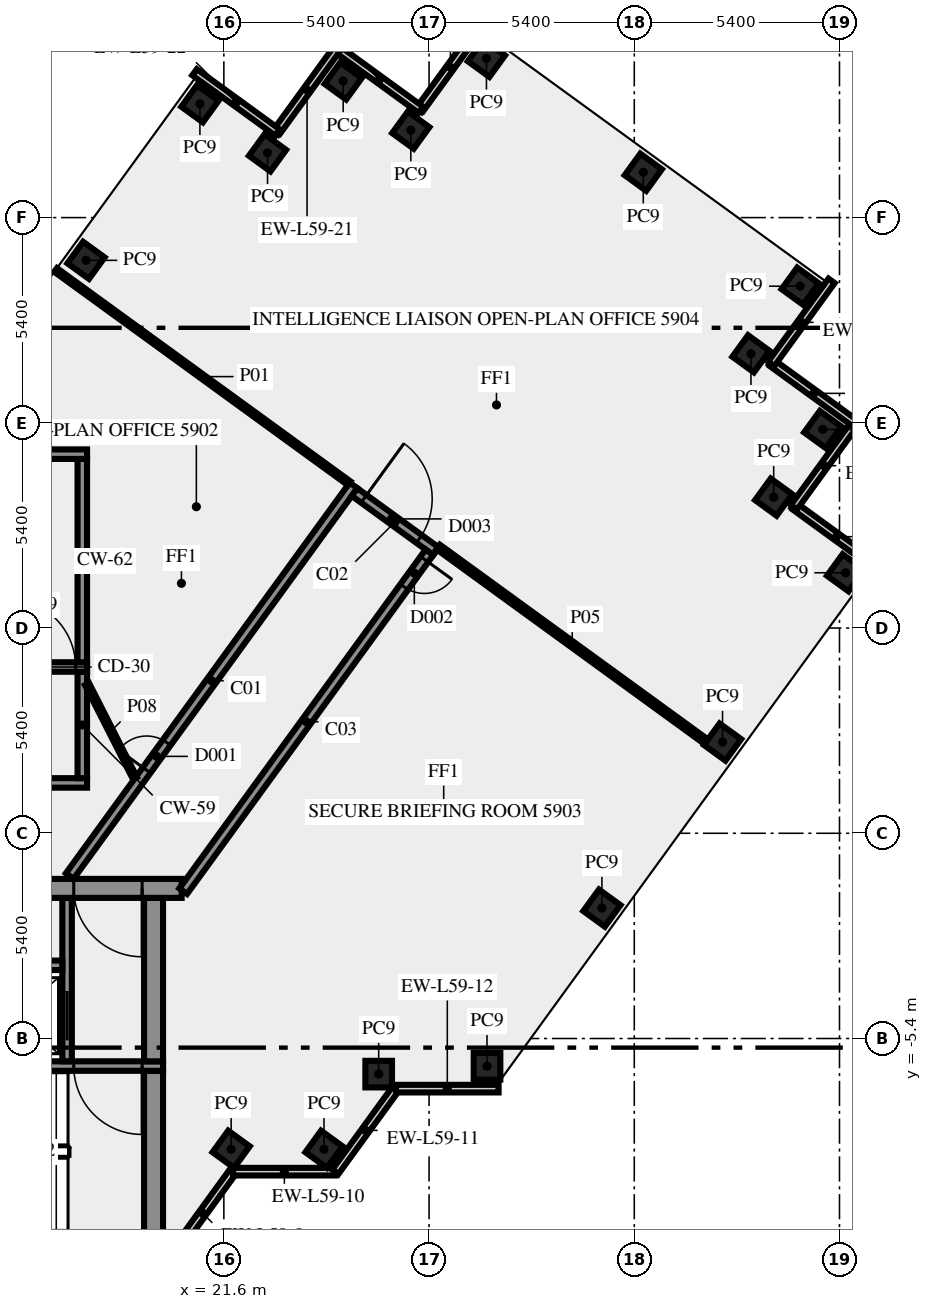
"""IFC4 building model, lengths in metres.
Left out: names, types, materials, properties, quantities, classifications, styles, units other than length and angle.
Written with IfcOpenShell. Run it as: python <this file> out.ifc"""

import sys

from ifc_helpers import new_model, si_unit, direction, frame, frame_2d, origin, origin_2d, place, context, subcontext, project, spatial, rectangle, extrude, element, fill, save


model = new_model("IFC4")
c1 = context("Model", 3, precision=1e-05, world=origin(), true_north=direction((0.0, 1.0)))
c2 = subcontext(c1, "Body", "Model", "MODEL_VIEW")
j1 = project(units=[si_unit("LENGTHUNIT", "METRE"), si_unit("PLANEANGLEUNIT", "RADIAN")], contexts=[c1])
p1 = place(None, origin())
s1 = spatial("IfcSite", under=j1, at=p1, CompositionType="ELEMENT")
p2 = place(p1, origin())
s2 = spatial("IfcBuilding", under=s1, at=p2, CompositionType="ELEMENT")
p3 = place(p2, frame((0.0, 0.0, 253.0)))
s3 = spatial("IfcBuildingStorey", under=s2, at=p3, CompositionType="ELEMENT", Elevation=253.0)
for number, where, z_axis, x_axis in (
    (1, (21.792, -8.315, 0.0), (0.0, 0.0, 1.0), (0.588, 0.809, 0.0)),
    (2, (24.235, -8.315, 0.0), (0.0, 0.0, 1.0), (0.588, 0.809, 0.0)),
    (3, (25.674, -6.337, 0.0), (0.0, 0.0, 1.0), (1.0, 0.0, 0.0)),
    (4, (28.525, -6.13, 0.0), (0.0, 0.0, 1.0), (1.0, 0.0, 0.0)),
    (5, (31.548, -1.969, 0.0), (0.0, 0.0, 1.0), (0.588, 0.809, 0.0)),
    (6, (34.722, 2.4, 0.0), (0.0, 0.0, 1.0), (0.588, 0.809, 0.0)),
    (7, (37.96, 6.855, 0.0), (0.0, 0.0, 1.0), (0.588, 0.809, 0.0)),
    (8, (36.068, 8.844, 0.0), (0.0, 0.0, 1.0), (0.588, 0.809, 0.0)),
    (9, (37.36, 10.625, 0.0), (0.0, 0.0, 1.0), (0.588, 0.809, 0.0)),
    (10, (35.471, 12.616, 0.0), (0.0, 0.0, 1.0), (-0.809, 0.588, 0.0)),
    (11, (36.765, 14.395, 0.0), (0.0, 0.0, 1.0), (-0.809, 0.588, 0.0)),
    (12, (32.637, 17.393, 0.0), (0.0, 0.0, 1.0), (-0.809, 0.588, 0.0)),
    (13, (28.51, 20.39, 0.0), (0.0, 0.0, 1.0), (-0.588, -0.809, 0.0)),
    (14, (26.519, 18.5, 0.0), (0.0, 0.0, 1.0), (-0.809, 0.588, 0.0)),
    (15, (24.74, 19.795, 0.0), (0.0, 0.0, 1.0), (-0.588, -0.809, 0.0)),
    (16, (22.749, 17.904, 0.0), (0.0, 0.0, 1.0), (-0.588, -0.809, 0.0)),
    (17, (20.97, 19.195, 0.0), (0.0, 0.0, 1.0), (-0.588, -0.809, 0.0)),
    (18, (17.974, 15.075, 0.0), (0.0, 0.0, 1.0), (-0.588, -0.809, 0.0)),
):
    element("IfcColumn", number, at=place(p3, frame(where, z_axis=z_axis, x_axis=x_axis)), inside=s3, PredefinedType="COLUMN", context=c2, shape_type="SweptSolid", body=[
        extrude(rectangle(XDim=0.7, YDim=0.7, at=origin_2d()), origin(), (0.0, 0.0, 1.0), 3.65),
    ])
p4 = place(p3, frame((20.253, -11.083, 0.0), z_axis=(0.0, 0.0, 1.0), x_axis=(0.587766567315, 0.809030569476, 0.0)))
e19 = element("IfcWall", 19, at=p4, inside=s3, PredefinedType="SOLIDWALL", context=c2, shape_type="SweptSolid", body=[
    extrude(rectangle(XDim=2.688, YDim=0.2, at=frame_2d((1.344, 0.0))), origin(), (0.0, 0.0, 1.0), 3.65),
])
p5 = place(p3, frame((21.843, -8.904, 0.0), z_axis=(0.0, 0.0, 1.0), x_axis=(1.0, 0.0, 0.0)))
e20 = element("IfcWall", 20, at=p5, inside=s3, PredefinedType="SOLIDWALL", context=c2, shape_type="SweptSolid", body=[
    extrude(rectangle(XDim=2.7, YDim=0.2, at=frame_2d((1.35, 0.0))), origin(), (0.0, 0.0, 1.0), 3.65),
])
p6 = place(p3, frame((24.533, -8.909, 0.0), z_axis=(0.0, 0.0, 1.0), x_axis=(0.587720002413, 0.809064397168, 0.0)))
e21 = element("IfcWall", 21, at=p6, inside=s3, PredefinedType="SOLIDWALL", context=c2, shape_type="SweptSolid", body=[
    extrude(rectangle(XDim=2.7, YDim=0.2, at=frame_2d((1.35, 0.0))), origin(), (0.0, 0.0, 1.0), 3.65),
])
for number, where, z_axis, x_axis in (
    (22, (26.13, -6.719, 0.0), (0.0, 0.0, 1.0), (1.0, 0.0, 0.0)),
    (23, (38.814, 7.01, 0.0), (0.0, 0.0, 1.0), (-0.809, 0.588, 0.0)),
    (24, (36.602, 8.58, 0.0), (0.0, 0.0, 1.0), (0.588, 0.809, 0.0)),
    (25, (38.216, 10.782, 0.0), (0.0, 0.0, 1.0), (-0.809, 0.588, 0.0)),
    (26, (36.005, 12.352, 0.0), (0.0, 0.0, 1.0), (0.588, 0.809, 0.0)),
):
    element("IfcWall", number, at=place(p3, frame(where, z_axis=z_axis, x_axis=x_axis)), inside=s3, PredefinedType="SOLIDWALL", context=c2, shape_type="SweptSolid", body=[
        extrude(rectangle(XDim=2.7, YDim=0.2, at=frame_2d((1.35, 0.0))), origin(), (0.0, 0.0, 1.0), 3.65),
    ])
for number, where, z_axis, x_axis in (
    (27, (28.354, 21.247, 0.0), (0.0, 0.0, 1.0), (-0.588, -0.809, 0.0)),
    (28, (26.785, 19.036, 0.0), (0.0, 0.0, 1.0), (-0.809, 0.588, 0.0)),
):
    element("IfcWall", number, at=place(p3, frame(where, z_axis=z_axis, x_axis=x_axis)), inside=s3, PredefinedType="SOLIDWALL", context=c2, shape_type="SweptSolid", body=[
        extrude(rectangle(XDim=2.7, YDim=0.2, at=frame_2d((1.35, 0.0))), origin(), (0.0, 0.0, 1.0), 3.65),
    ])
for number, where, z_axis, x_axis in (
    (29, (24.583, 20.65, 0.0), (0.0, 0.0, 1.0), (-0.588, -0.809, 0.0)),
    (30, (23.013, 18.438, 0.0), (0.0, 0.0, 1.0), (-0.809, 0.588, 0.0)),
):
    element("IfcWall", number, at=place(p3, frame(where, z_axis=z_axis, x_axis=x_axis)), inside=s3, PredefinedType="SOLIDWALL", context=c2, shape_type="SweptSolid", body=[
        extrude(rectangle(XDim=2.7, YDim=0.2, at=frame_2d((1.35, 0.0))), origin(), (0.0, 0.0, 1.0), 3.65),
    ])
p7 = place(p3, frame((19.75, -10.5, 0.0), z_axis=(0.0, 0.0, 1.0), x_axis=(0.0, 1.0, 0.0)))
e31 = element("IfcWall", 31, at=p7, inside=s3, PredefinedType="SHEAR", context=c2, shape_type="SweptSolid", body=[
    extrude(rectangle(XDim=4.25, YDim=0.5, at=frame_2d((2.125, 0.0))), origin(), (0.0, 0.0, 1.0), 3.65),
])
p8 = place(p3, frame((20.0, -6.125, 0.0), z_axis=(0.0, 0.0, 1.0), x_axis=(-1.0, 0.0, 0.0)))
e32 = element("IfcWall", 32, at=p8, inside=s3, PredefinedType="SHEAR", context=c2, shape_type="SweptSolid", body=[
    extrude(rectangle(XDim=10.2, YDim=0.25, at=frame_2d((5.1, 0.0))), origin(), (0.0, 0.0, 1.0), 3.65),
])
p9 = place(p8, frame((0.55, 0.0, 0.0)))
e33 = element("IfcOpeningElement", 33, at=p9, cuts=e32, PredefinedType="OPENING", context=c2, shape_type="SweptSolid", body=[
    extrude(rectangle(XDim=1.8, YDim=2.1, at=frame_2d((0.9, 1.05))), frame((0.0, 0.135, 0.0), z_axis=(0.0, -1.0, 0.0), x_axis=(1.0, 0.0, 0.0)), (0.0, 0.0, 1.0), 0.27),
])
p10 = place(p3, frame((17.475, -6.0, 0.0), z_axis=(0.0, 0.0, 1.0), x_axis=(0.0, 1.0, 0.0)))
e34 = element("IfcWall", 34, at=p10, inside=s3, PredefinedType="SHEAR", context=c2, shape_type="SweptSolid", body=[
    extrude(rectangle(XDim=4.3, YDim=0.25, at=frame_2d((2.15, 0.0))), origin(), (0.0, 0.0, 1.0), 3.65),
])
p11 = place(p10, frame((0.55, 0.0, 0.0)))
e35 = element("IfcOpeningElement", 35, at=p11, cuts=e34, PredefinedType="OPENING", context=c2, shape_type="SweptSolid", body=[
    extrude(rectangle(XDim=1.3, YDim=2.1, at=frame_2d((0.65, 1.05))), frame((0.0, 0.135, 0.0), z_axis=(0.0, -1.0, 0.0), x_axis=(1.0, 0.0, 0.0)), (0.0, 0.0, 1.0), 0.27),
])
p12 = place(p3, frame((19.75, -6.0, 0.0), z_axis=(0.0, 0.0, 1.0), x_axis=(0.0, 1.0, 0.0)))
e36 = element("IfcWall", 36, at=p12, inside=s3, PredefinedType="SHEAR", context=c2, shape_type="SweptSolid", body=[
    extrude(rectangle(XDim=4.3, YDim=0.5, at=frame_2d((2.15, 0.0))), origin(), (0.0, 0.0, 1.0), 3.65),
])
p13 = place(p3, frame((14.1, -3.475, 0.0), z_axis=(0.0, 0.0, 1.0), x_axis=(1.0, 0.0, 0.0)))
e37 = element("IfcWall", 37, at=p13, inside=s3, PredefinedType="SHEAR", context=c2, shape_type="SweptSolid", body=[
    extrude(rectangle(XDim=3.25, YDim=0.25, at=frame_2d((1.625, 0.0))), origin(), (0.0, 0.0, 1.0), 3.65),
])
p14 = place(p3, frame((20.49, -1.45, 0.0), z_axis=(0.0, 0.0, 1.0), x_axis=(-1.0, 0.0, 0.0)))
e38 = element("IfcWall", 38, at=p14, inside=s3, PredefinedType="SHEAR", context=c2, shape_type="SweptSolid", body=[
    extrude(rectangle(XDim=40.98, YDim=0.5, at=frame_2d((20.49, 0.0))), origin(), (0.0, 0.0, 1.0), 3.65),
])
p15 = place(p14, frame((38.14, 0.0, 0.0)))
e39 = element("IfcOpeningElement", 39, at=p15, cuts=e38, PredefinedType="OPENING", context=c2, shape_type="SweptSolid", body=[
    extrude(rectangle(XDim=1.8, YDim=2.1, at=frame_2d((0.9, 1.05))), frame((0.0, 0.26, 0.0), z_axis=(0.0, -1.0, 0.0), x_axis=(1.0, 0.0, 0.0)), (0.0, 0.0, 1.0), 0.52),
])
p16 = place(p14, frame((35.89, 0.0, 0.0)))
e40 = element("IfcOpeningElement", 40, at=p16, cuts=e38, PredefinedType="OPENING", context=c2, shape_type="SweptSolid", body=[
    extrude(rectangle(XDim=0.9, YDim=2.1, at=frame_2d((0.45, 1.05))), frame((0.0, 0.26, 0.0), z_axis=(0.0, -1.0, 0.0), x_axis=(1.0, 0.0, 0.0)), (0.0, 0.0, 1.0), 0.52),
])
p17 = place(p14, frame((32.94, 0.0, 0.0)))
e41 = element("IfcOpeningElement", 41, at=p17, cuts=e38, PredefinedType="OPENING", context=c2, shape_type="SweptSolid", body=[
    extrude(rectangle(XDim=0.9, YDim=2.1, at=frame_2d((0.45, 1.05))), frame((0.0, 0.26, 0.0), z_axis=(0.0, -1.0, 0.0), x_axis=(1.0, 0.0, 0.0)), (0.0, 0.0, 1.0), 0.52),
])
p18 = place(p14, frame((31.015, 0.0, 0.0)))
e42 = element("IfcOpeningElement", 42, at=p18, cuts=e38, PredefinedType="OPENING", context=c2, shape_type="SweptSolid", body=[
    extrude(rectangle(XDim=0.8, YDim=2.1, at=frame_2d((0.4, 1.05))), frame((0.0, 0.26, 0.0), z_axis=(0.0, -1.0, 0.0), x_axis=(1.0, 0.0, 0.0)), (0.0, 0.0, 1.0), 0.52),
])
p19 = place(p14, frame((24.765, 0.0, 0.0)))
e43 = element("IfcOpeningElement", 43, at=p19, cuts=e38, PredefinedType="OPENING", context=c2, shape_type="SweptSolid", body=[
    extrude(rectangle(XDim=0.8, YDim=2.1, at=frame_2d((0.4, 1.05))), frame((0.0, 0.26, 0.0), z_axis=(0.0, -1.0, 0.0), x_axis=(1.0, 0.0, 0.0)), (0.0, 0.0, 1.0), 0.52),
])
p20 = place(p14, frame((21.765, 0.0, 0.0)))
e44 = element("IfcOpeningElement", 44, at=p20, cuts=e38, PredefinedType="OPENING", context=c2, shape_type="SweptSolid", body=[
    extrude(rectangle(XDim=2.0, YDim=2.1, at=frame_2d((1.0, 1.05))), frame((0.0, 0.26, 0.0), z_axis=(0.0, -1.0, 0.0), x_axis=(1.0, 0.0, 0.0)), (0.0, 0.0, 1.0), 0.52),
])
p21 = place(p14, frame((14.202, 0.0, 0.0)))
e45 = element("IfcOpeningElement", 45, at=p21, cuts=e38, PredefinedType="OPENING", context=c2, shape_type="SweptSolid", body=[
    extrude(rectangle(XDim=0.9, YDim=2.1, at=frame_2d((0.45, 1.05))), frame((0.0, 0.26, 0.0), z_axis=(0.0, -1.0, 0.0), x_axis=(1.0, 0.0, 0.0)), (0.0, 0.0, 1.0), 0.52),
])
p22 = place(p14, frame((10.478, 0.0, 0.0)))
e46 = element("IfcOpeningElement", 46, at=p22, cuts=e38, PredefinedType="OPENING", context=c2, shape_type="SweptSolid", body=[
    extrude(rectangle(XDim=0.9, YDim=2.1, at=frame_2d((0.45, 1.05))), frame((0.0, 0.26, 0.0), z_axis=(0.0, -1.0, 0.0), x_axis=(1.0, 0.0, 0.0)), (0.0, 0.0, 1.0), 0.52),
])
p23 = place(p14, frame((7.14, 0.0, 0.0)))
e47 = element("IfcOpeningElement", 47, at=p23, cuts=e38, PredefinedType="OPENING", context=c2, shape_type="SweptSolid", body=[
    extrude(rectangle(XDim=0.9, YDim=2.1, at=frame_2d((0.45, 1.05))), frame((0.0, 0.26, 0.0), z_axis=(0.0, -1.0, 0.0), x_axis=(1.0, 0.0, 0.0)), (0.0, 0.0, 1.0), 0.52),
])
p24 = place(p14, frame((5.028, 0.0, 0.0)))
e48 = element("IfcOpeningElement", 48, at=p24, cuts=e38, PredefinedType="OPENING", context=c2, shape_type="SweptSolid", body=[
    extrude(rectangle(XDim=0.8, YDim=2.1, at=frame_2d((0.4, 1.05))), frame((0.0, 0.26, 0.0), z_axis=(0.0, -1.0, 0.0), x_axis=(1.0, 0.0, 0.0)), (0.0, 0.0, 1.0), 0.52),
])
p25 = place(p14, frame((3.452, 0.0, 0.0)))
e49 = element("IfcOpeningElement", 49, at=p25, cuts=e38, PredefinedType="OPENING", context=c2, shape_type="SweptSolid", body=[
    extrude(rectangle(XDim=0.8, YDim=2.1, at=frame_2d((0.4, 1.05))), frame((0.0, 0.26, 0.0), z_axis=(0.0, -1.0, 0.0), x_axis=(1.0, 0.0, 0.0)), (0.0, 0.0, 1.0), 0.52),
])
p26 = place(p14, frame((1.04, 0.0, 0.0)))
e50 = element("IfcOpeningElement", 50, at=p26, cuts=e38, PredefinedType="OPENING", context=c2, shape_type="SweptSolid", body=[
    extrude(rectangle(XDim=1.8, YDim=2.1, at=frame_2d((0.9, 1.05))), frame((0.0, 0.26, 0.0), z_axis=(0.0, -1.0, 0.0), x_axis=(1.0, 0.0, 0.0)), (0.0, 0.0, 1.0), 0.52),
])
p27 = place(p3, frame((14.1, 1.325, 0.0), z_axis=(0.0, 0.0, 1.0), x_axis=(1.0, 0.0, 0.0)))
e51 = element("IfcWall", 51, at=p27, inside=s3, PredefinedType="SHEAR", context=c2, shape_type="SweptSolid", body=[
    extrude(rectangle(XDim=3.9, YDim=0.25, at=frame_2d((1.95, 0.0))), origin(), (0.0, 0.0, 1.0), 3.65),
])
p28 = place(p27, frame((1.0, 0.0, 0.0)))
e52 = element("IfcOpeningElement", 52, at=p28, cuts=e51, PredefinedType="OPENING", context=c2, shape_type="SweptSolid", body=[
    extrude(rectangle(XDim=1.8, YDim=2.1, at=frame_2d((0.9, 1.05))), frame((0.0, 0.135, 0.0), z_axis=(0.0, -1.0, 0.0), x_axis=(1.0, 0.0, 0.0)), (0.0, 0.0, 1.0), 0.27),
])
p29 = place(p3, frame((17.875, 1.45, 0.0), z_axis=(0.0, 0.0, 1.0), x_axis=(0.0, 1.0, 0.0)))
e53 = element("IfcWall", 53, at=p29, inside=s3, PredefinedType="SHEAR", context=c2, shape_type="SweptSolid", body=[
    extrude(rectangle(XDim=2.8, YDim=0.25, at=frame_2d((1.4, 0.0))), origin(), (0.0, 0.0, 1.0), 3.65),
])
p30 = place(p3, frame((7.5, 4.375, 0.0), z_axis=(0.0, 0.0, 1.0), x_axis=(1.0, 0.0, 0.0)))
e54 = element("IfcWall", 54, at=p30, inside=s3, PredefinedType="SHEAR", context=c2, shape_type="SweptSolid", body=[
    extrude(rectangle(XDim=10.5, YDim=0.25, at=frame_2d((5.25, 0.0))), origin(), (0.0, 0.0, 1.0), 3.65),
])
p31 = place(p30, frame((8.4, 0.0, 0.0)))
e55 = element("IfcOpeningElement", 55, at=p31, cuts=e54, PredefinedType="OPENING", context=c2, shape_type="SweptSolid", body=[
    extrude(rectangle(XDim=1.8, YDim=2.1, at=frame_2d((0.9, 1.05))), frame((0.0, 0.135, 0.0), z_axis=(0.0, -1.0, 0.0), x_axis=(1.0, 0.0, 0.0)), (0.0, 0.0, 1.0), 0.27),
])
p32 = place(p3, frame((17.875, 4.5, 0.0), z_axis=(0.0, 0.0, 1.0), x_axis=(0.0, 1.0, 0.0)))
e56 = element("IfcWall", 56, at=p32, inside=s3, PredefinedType="SHEAR", context=c2, shape_type="SweptSolid", body=[
    extrude(rectangle(XDim=5.35, YDim=0.25, at=frame_2d((2.675, 0.0))), origin(), (0.0, 0.0, 1.0), 3.65),
])
p33 = place(p3, frame((7.5, 9.975, 0.0), z_axis=(0.0, 0.0, 1.0), x_axis=(1.0, 0.0, 0.0)))
e57 = element("IfcWall", 57, at=p33, inside=s3, PredefinedType="SHEAR", context=c2, shape_type="SweptSolid", body=[
    extrude(rectangle(XDim=10.5, YDim=0.25, at=frame_2d((5.25, 0.0))), origin(), (0.0, 0.0, 1.0), 3.65),
])
p34 = place(p33, frame((2.0, 0.0, 1.0)))
e58 = element("IfcOpeningElement", 58, at=p34, cuts=e57, PredefinedType="OPENING", context=c2, shape_type="SweptSolid", body=[
    extrude(rectangle(XDim=1.2, YDim=1.2, at=frame_2d((0.6, 0.6))), frame((0.0, 0.135, 0.0), z_axis=(0.0, -1.0, 0.0), x_axis=(1.0, 0.0, 0.0)), (0.0, 0.0, 1.0), 0.27),
])
p35 = place(p3, frame((17.545, -1.125, 0.0), z_axis=(0.0, 0.0, 1.0), x_axis=(0.587796810203, 0.809008596935, 0.0)))
e59 = element("IfcWall", 59, at=p35, inside=s3, PredefinedType="SOLIDWALL", context=c2, shape_type="SweptSolid", body=[
    extrude(rectangle(XDim=12.703, YDim=0.25, at=frame_2d((6.352, 0.0))), origin(), (0.0, 0.0, 1.0), 3.65),
])
p36 = place(p35, frame((3.441, 0.0, 0.0)))
e60 = element("IfcOpeningElement", 60, at=p36, cuts=e59, PredefinedType="OPENING", context=c2, shape_type="SweptSolid", body=[
    extrude(rectangle(XDim=0.9, YDim=2.1, at=frame_2d((0.45, 1.05))), frame((0.0, 0.135, 0.0), z_axis=(0.0, -1.0, 0.0), x_axis=(1.0, 0.0, 0.0)), (0.0, 0.0, 1.0), 0.27),
])
p37 = place(p3, frame((25.039, 8.978, 0.0), z_axis=(0.0, 0.0, 1.0), x_axis=(0.809006914995, -0.587799125119, 0.0)))
e61 = element("IfcWall", 61, at=p37, inside=s3, PredefinedType="SOLIDWALL", context=c2, shape_type="SweptSolid", body=[
    extrude(rectangle(XDim=2.65, YDim=0.25, at=frame_2d((1.325, 0.0))), origin(), (0.0, 0.0, 1.0), 3.65),
])
p38 = place(p37, frame((0.301, 0.0, 0.0)))
e62 = element("IfcOpeningElement", 62, at=p38, cuts=e61, PredefinedType="OPENING", context=c2, shape_type="SweptSolid", body=[
    extrude(rectangle(XDim=1.8, YDim=2.1, at=frame_2d((0.9, 1.05))), frame((0.0, 0.135, 0.0), z_axis=(0.0, -1.0, 0.0), x_axis=(1.0, 0.0, 0.0)), (0.0, 0.0, 1.0), 0.27),
])
p39 = place(p3, frame((27.009, 7.392, 0.0), z_axis=(0.0, 0.0, 1.0), x_axis=(-0.587776457057, -0.809023384414, 0.0)))
e63 = element("IfcWall", 63, at=p39, inside=s3, PredefinedType="SOLIDWALL", context=c2, shape_type="SweptSolid", body=[
    extrude(rectangle(XDim=11.021, YDim=0.25, at=frame_2d((5.51, 0.0))), origin(), (0.0, 0.0, 1.0), 3.65),
])
p40 = place(p39, frame((0.225, 0.0, 0.0)))
e64 = element("IfcOpeningElement", 64, at=p40, cuts=e63, PredefinedType="OPENING", context=c2, shape_type="SweptSolid", body=[
    extrude(rectangle(XDim=0.9, YDim=2.1, at=frame_2d((0.45, 1.05))), frame((0.0, 0.135, 0.0), z_axis=(0.0, -1.0, 0.0), x_axis=(1.0, 0.0, 0.0)), (0.0, 0.0, 1.0), 0.27),
])
p41 = place(p3, frame((24.898, 9.209, 0.0), z_axis=(0.0, 0.0, 1.0), x_axis=(-0.809013490065, 0.587790075531, 0.0)))
e65 = element("IfcWall", 65, at=p41, inside=s3, PredefinedType="PARTITIONING", context=c2, shape_type="SweptSolid", body=[
    extrude(rectangle(XDim=9.549, YDim=0.12, at=frame_2d((4.775, 0.0))), origin(), (0.0, 0.0, 1.0), 2.95),
])
p42 = place(p3, frame((27.24, 7.532, 0.0), z_axis=(0.0, 0.0, 1.0), x_axis=(0.809027940177, -0.587770186393, 0.0)))
e66 = element("IfcWall", 66, at=p42, inside=s3, PredefinedType="PARTITIONING", context=c2, shape_type="SweptSolid", body=[
    extrude(rectangle(XDim=8.715, YDim=0.15, at=frame_2d((4.357, 0.0))), origin(), (0.0, 0.0, 1.0), 3.65),
])
p43 = place(p3, frame((18.0, 3.925, 0.0), z_axis=(0.0, 0.0, 1.0), x_axis=(0.453950796792, -0.891026752736, 0.0)))
e67 = element("IfcWall", 67, at=p43, inside=s3, PredefinedType="PARTITIONING", context=c2, shape_type="SweptSolid", body=[
    extrude(rectangle(XDim=2.778, YDim=0.12, at=frame_2d((1.389, 0.0))), origin(), (0.0, 0.0, 1.0), 3.65),
])
p44 = place(p9, origin())
e68 = element("IfcDoor", 68, at=p44, inside=s3, OperationType="DOUBLE_DOOR_SINGLE_SWING", PredefinedType="DOOR", context=c2, shape_type="SweptSolid", body=[
    extrude(rectangle(XDim=1.8, YDim=2.1, at=frame_2d((0.9, 1.05))), frame((0.0, 0.025, 0.0), z_axis=(0.0, -1.0, 0.0), x_axis=(1.0, 0.0, 0.0)), (0.0, 0.0, 1.0), 0.05),
])
fill(e33, e68)
p45 = place(p11, origin())
e69 = element("IfcDoor", 69, at=p45, inside=s3, OperationType="DOUBLE_DOOR_SLIDING", PredefinedType="DOOR", context=c2, shape_type="SweptSolid", body=[
    extrude(rectangle(XDim=1.3, YDim=2.1, at=frame_2d((0.65, 1.05))), frame((0.0, 0.025, 0.0), z_axis=(0.0, -1.0, 0.0), x_axis=(1.0, 0.0, 0.0)), (0.0, 0.0, 1.0), 0.05),
])
fill(e35, e69)
p46 = place(p26, origin())
e70 = element("IfcDoor", 70, at=p46, inside=s3, OperationType="DOUBLE_DOOR_SINGLE_SWING", PredefinedType="DOOR", context=c2, shape_type="SweptSolid", body=[
    extrude(rectangle(XDim=1.8, YDim=2.1, at=frame_2d((0.9, 1.05))), frame((0.0, 0.025, 0.0), z_axis=(0.0, -1.0, 0.0), x_axis=(1.0, 0.0, 0.0)), (0.0, 0.0, 1.0), 0.05),
])
fill(e50, e70)
p47 = place(p31, origin())
e71 = element("IfcDoor", 71, at=p47, inside=s3, OperationType="DOUBLE_DOOR_SINGLE_SWING", PredefinedType="DOOR", context=c2, shape_type="SweptSolid", body=[
    extrude(rectangle(XDim=1.8, YDim=2.1, at=frame_2d((0.9, 1.05))), frame((0.0, 0.025, 0.0), z_axis=(0.0, -1.0, 0.0), x_axis=(1.0, 0.0, 0.0)), (0.0, 0.0, 1.0), 0.05),
])
fill(e55, e71)
p48 = place(p36, origin())
e72 = element("IfcDoor", 72, at=p48, inside=s3, OperationType="SINGLE_SWING_LEFT", PredefinedType="DOOR", context=c2, shape_type="SweptSolid", body=[
    extrude(rectangle(XDim=0.9, YDim=2.1, at=frame_2d((0.45, 1.05))), frame((0.0, 0.025, 0.0), z_axis=(0.0, -1.0, 0.0), x_axis=(1.0, 0.0, 0.0)), (0.0, 0.0, 1.0), 0.05),
])
fill(e60, e72)
p49 = place(p38, origin())
e73 = element("IfcDoor", 73, at=p49, inside=s3, OperationType="DOUBLE_DOOR_SINGLE_SWING", PredefinedType="DOOR", context=c2, shape_type="SweptSolid", body=[
    extrude(rectangle(XDim=1.8, YDim=2.1, at=frame_2d((0.9, 1.05))), frame((0.0, 0.025, 0.0), z_axis=(0.0, -1.0, 0.0), x_axis=(1.0, 0.0, 0.0)), (0.0, 0.0, 1.0), 0.05),
])
fill(e62, e73)
p50 = place(p40, origin())
e74 = element("IfcDoor", 74, at=p50, inside=s3, OperationType="SINGLE_SWING_LEFT", PredefinedType="DOOR", context=c2, shape_type="SweptSolid", body=[
    extrude(rectangle(XDim=0.9, YDim=2.1, at=frame_2d((0.45, 1.05))), frame((0.0, 0.025, 0.0), z_axis=(0.0, -1.0, 0.0), x_axis=(1.0, 0.0, 0.0)), (0.0, 0.0, 1.0), 0.05),
])
fill(e64, e74)
save(model, sys.argv[1])
